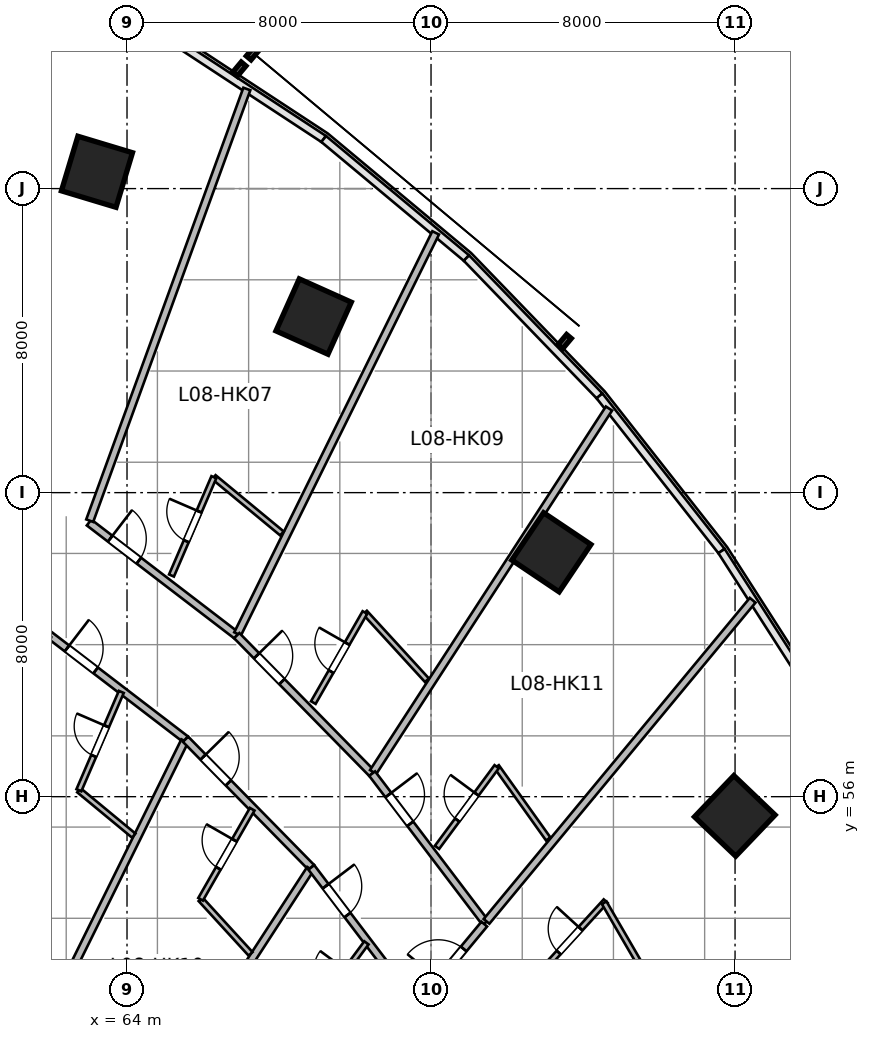
"""IFC4 building model, lengths in metres.
Left out: names, types, materials, properties, quantities, classifications, styles, units other than length and angle.
Written with IfcOpenShell. Run it as: python <this file> out.ifc"""

import sys

from ifc_helpers import new_model, si_unit, direction, frame, frame_2d, origin, origin_2d, place, context, subcontext, project, spatial, rectangle, extrude, source, transform, mapped, element, fill, save


model = new_model("IFC4")
c1 = context("Model", 3, precision=1e-05, world=origin(), true_north=direction((0.0, 1.0)))
c2 = subcontext(c1, "Body", "Model", "MODEL_VIEW")
j1 = project(units=[si_unit("LENGTHUNIT", "METRE"), si_unit("PLANEANGLEUNIT", "RADIAN")], contexts=[c1])
p1 = place(None, origin())
s1 = spatial("IfcSite", under=j1, at=p1, CompositionType="ELEMENT")
p2 = place(p1, origin())
s2 = spatial("IfcBuilding", under=s1, at=p2, CompositionType="ELEMENT")
p3 = place(p2, frame((0.0, 0.0, 42.6)))
s3 = spatial("IfcBuildingStorey", under=s2, at=p3, CompositionType="ELEMENT", Elevation=42.6)
m1 = source(origin(), c2, "Body", "SweptSolid", [
    extrude(rectangle(XDim=1.5, YDim=1.5, at=origin_2d()), origin(), (0.0, 0.0, 1.0), 3.6),
])
for number, where, z_axis, x_axis in (
    (1, (63.209, 72.442, 0.0), (0.0, 0.0, 1.0), (0.289, 0.957, 0.0)),
    (2, (68.91, 68.633, 0.0), (0.0, 0.0, 1.0), (0.409, 0.912, 0.0)),
    (3, (75.167, 62.43, 0.0), (0.0, 0.0, 1.0), (0.558, 0.83, 0.0)),
    (4, (79.993, 55.494, 0.0), (0.0, 0.0, 1.0), (0.691, 0.723, 0.0)),
):
    element("IfcColumn", number, at=place(p3, frame(where, z_axis=z_axis, x_axis=x_axis)), inside=s3, PredefinedType="COLUMN", context=c2, shape_type="MappedRepresentation", body=[
        mapped(m1, transform((0.0, 0.0, 0.0), scale=1.0)),
    ])
m2 = source(origin(), c2, "Body", "SweptSolid", [
    extrude(rectangle(XDim=4.895, YDim=0.195, at=frame_2d((2.447, 0.0))), origin(), (0.0, 0.0, 1.0), 3.36),
])
p4 = place(p3, frame((63.001, 63.214, 0.0), z_axis=(0.0, 0.0, 1.0), x_axis=(0.793896075849, -0.608053468661, 0.0)))
e5 = element("IfcWall", 5, at=p4, inside=s3, PredefinedType="PARTITIONING", context=c2, shape_type="MappedRepresentation", body=[
    mapped(m2, transform((0.0, 0.0, 0.0), scale=1.0)),
])
p5 = place(p4, frame((0.7, 0.0, 0.0)))
e6 = element("IfcOpeningElement", 6, at=p5, cuts=e5, PredefinedType="OPENING", context=c2, shape_type="SweptSolid", body=[
    extrude(rectangle(XDim=0.95, YDim=2.15, at=frame_2d((0.475, 1.075))), frame((0.0, 0.107, 0.0), z_axis=(0.0, -1.0, 0.0), x_axis=(1.0, 0.0, 0.0)), (0.0, 0.0, 1.0), 0.215),
])
m3 = source(origin(), c2, "Body", "SweptSolid", [
    extrude(rectangle(XDim=12.088, YDim=0.195, at=frame_2d((6.044, 0.0))), origin(), (0.0, 0.0, 1.0), 3.36),
])
p6 = place(p3, frame((63.019, 63.262, 0.0), z_axis=(0.0, 0.0, 1.0), x_axis=(0.34203007529, 0.939689005787, 0.0)))
e7 = element("IfcWall", 7, at=p6, inside=s3, PredefinedType="PARTITIONING", context=c2, shape_type="MappedRepresentation", body=[
    mapped(m3, transform((0.0, 0.0, 0.0), scale=1.0)),
])
m4 = source(origin(), c2, "Body", "SweptSolid", [
    extrude(rectangle(XDim=11.77, YDim=0.195, at=frame_2d((5.885, 0.0))), origin(), (0.0, 0.0, 1.0), 3.36),
])
p7 = place(p3, frame((66.909, 60.282, 0.0), z_axis=(0.0, 0.0, 1.0), x_axis=(0.44286060326, 0.896590478468, 0.0)))
e8 = element("IfcWall", 8, at=p7, inside=s3, PredefinedType="PARTITIONING", context=c2, shape_type="MappedRepresentation", body=[
    mapped(m4, transform((0.0, 0.0, 0.0), scale=1.0)),
])
m5 = source(origin(), c2, "Body", "SweptSolid", [
    extrude(rectangle(XDim=2.324, YDim=0.14, at=frame_2d((1.162, 0.0))), origin(), (0.0, 0.0, 1.0), 3.36),
])
p8 = place(p3, frame((66.286, 64.407, 0.0), z_axis=(0.0, 0.0, 1.0), x_axis=(0.770746444956, -0.637141991701, 0.0)))
e9 = element("IfcWall", 9, at=p8, inside=s3, PredefinedType="PARTITIONING", context=c2, shape_type="MappedRepresentation", body=[
    mapped(m5, transform((0.0, 0.0, 0.0), scale=1.0)),
])
m6 = source(origin(), c2, "Body", "SweptSolid", [
    extrude(rectangle(XDim=2.818, YDim=0.14, at=frame_2d((1.409, 0.0))), origin(), (0.0, 0.0, 1.0), 3.36),
])
p9 = place(p3, frame((65.17, 61.819, 0.0), z_axis=(0.0, 0.0, 1.0), x_axis=(0.395894859341, 0.918295845764, 0.0)))
e10 = element("IfcWall", 10, at=p9, inside=s3, PredefinedType="PARTITIONING", context=c2, shape_type="MappedRepresentation", body=[
    mapped(m6, transform((0.0, 0.0, 0.0), scale=1.0)),
])
p10 = place(p9, frame((0.984, 0.0, 0.0)))
e11 = element("IfcOpeningElement", 11, at=p10, cuts=e10, PredefinedType="OPENING", context=c2, shape_type="SweptSolid", body=[
    extrude(rectangle(XDim=0.85, YDim=2.05, at=frame_2d((0.425, 1.025))), frame((0.0, 0.08, 0.0), z_axis=(0.0, -1.0, 0.0), x_axis=(1.0, 0.0, 0.0)), (0.0, 0.0, 1.0), 0.16),
])
m7 = source(origin(), c2, "Body", "SweptSolid", [
    extrude(rectangle(XDim=4.546, YDim=0.195, at=frame_2d((2.273, 0.0))), origin(), (0.0, 0.0, 1.0), 3.36),
])
p11 = place(p3, frame((61.931, 60.275, 0.0), z_axis=(0.0, 0.0, 1.0), x_axis=(0.793907931297, -0.608037989457, 0.0)))
e12 = element("IfcWall", 12, at=p11, inside=s3, PredefinedType="PARTITIONING", context=c2, shape_type="MappedRepresentation", body=[
    mapped(m7, transform((0.0, 0.0, 0.0), scale=1.0)),
])
p12 = place(p11, frame((0.616, 0.0, 0.0)))
e13 = element("IfcOpeningElement", 13, at=p12, cuts=e12, PredefinedType="OPENING", context=c2, shape_type="SweptSolid", body=[
    extrude(rectangle(XDim=0.95, YDim=2.15, at=frame_2d((0.475, 1.075))), frame((0.0, 0.107, 0.0), z_axis=(0.0, -1.0, 0.0), x_axis=(1.0, 0.0, 0.0)), (0.0, 0.0, 1.0), 0.215),
])
m8 = source(origin(), c2, "Body", "SweptSolid", [
    extrude(rectangle(XDim=11.844, YDim=0.195, at=frame_2d((5.922, 0.0))), origin(), (0.0, 0.0, 1.0), 3.36),
])
p13 = place(p3, frame((60.273, 46.848, 0.0), z_axis=(0.0, 0.0, 1.0), x_axis=(0.442871152218, 0.896585267854, 0.0)))
e14 = element("IfcWall", 14, at=p13, inside=s3, PredefinedType="PARTITIONING", context=c2, shape_type="MappedRepresentation", body=[
    mapped(m8, transform((0.0, 0.0, 0.0), scale=1.0)),
])
m9 = source(origin(), c2, "Body", "SweptSolid", [
    extrude(rectangle(XDim=1.873, YDim=0.14, at=frame_2d((0.937, 0.0))), origin(), (0.0, 0.0, 1.0), 3.36),
])
p14 = place(p3, frame((62.734, 56.169, 0.0), z_axis=(0.0, 0.0, 1.0), x_axis=(0.77069451688, -0.637204803537, 0.0)))
e15 = element("IfcWall", 15, at=p14, inside=s3, PredefinedType="PARTITIONING", context=c2, shape_type="MappedRepresentation", body=[
    mapped(m9, transform((0.0, 0.0, 0.0), scale=1.0)),
])
m10 = source(origin(), c2, "Body", "SweptSolid", [
    extrude(rectangle(XDim=2.817, YDim=0.14, at=frame_2d((1.409, 0.0))), origin(), (0.0, 0.0, 1.0), 3.36),
])
p15 = place(p3, frame((62.734, 56.169, 0.0), z_axis=(0.0, 0.0, 1.0), x_axis=(0.395999429727, 0.918250756415, 0.0)))
e16 = element("IfcWall", 16, at=p15, inside=s3, PredefinedType="PARTITIONING", context=c2, shape_type="MappedRepresentation", body=[
    mapped(m10, transform((0.0, 0.0, 0.0), scale=1.0)),
])
p16 = place(p15, frame((0.984, 0.0, 0.0)))
e17 = element("IfcOpeningElement", 17, at=p16, cuts=e16, PredefinedType="OPENING", context=c2, shape_type="SweptSolid", body=[
    extrude(rectangle(XDim=0.85, YDim=2.05, at=frame_2d((0.425, 1.025))), frame((0.0, 0.08, 0.0), z_axis=(0.0, -1.0, 0.0), x_axis=(1.0, 0.0, 0.0)), (0.0, 0.0, 1.0), 0.16),
])
m11 = source(origin(), c2, "Body", "SweptSolid", [
    extrude(rectangle(XDim=5.087, YDim=0.195, at=frame_2d((2.543, 0.0))), origin(), (0.0, 0.0, 1.0), 3.36),
])
p17 = place(p3, frame((66.887, 60.238, 0.0), z_axis=(0.0, 0.0, 1.0), x_axis=(0.700428330775, -0.7137227427, 0.0)))
e18 = element("IfcWall", 18, at=p17, inside=s3, PredefinedType="PARTITIONING", context=c2, shape_type="MappedRepresentation", body=[
    mapped(m11, transform((0.0, 0.0, 0.0), scale=1.0)),
])
p18 = place(p17, frame((0.746, 0.0, 0.0)))
e19 = element("IfcOpeningElement", 19, at=p18, cuts=e18, PredefinedType="OPENING", context=c2, shape_type="SweptSolid", body=[
    extrude(rectangle(XDim=0.95, YDim=2.15, at=frame_2d((0.475, 1.075))), frame((0.0, 0.107, 0.0), z_axis=(0.0, -1.0, 0.0), x_axis=(1.0, 0.0, 0.0)), (0.0, 0.0, 1.0), 0.215),
])
m12 = source(origin(), c2, "Body", "SweptSolid", [
    extrude(rectangle(XDim=11.403, YDim=0.195, at=frame_2d((5.701, 0.0))), origin(), (0.0, 0.0, 1.0), 3.36),
])
p19 = place(p3, frame((70.477, 56.647, 0.0), z_axis=(0.0, 0.0, 1.0), x_axis=(0.544246090008, 0.838925618581, 0.0)))
e20 = element("IfcWall", 20, at=p19, inside=s3, PredefinedType="PARTITIONING", context=c2, shape_type="MappedRepresentation", body=[
    mapped(m12, transform((0.0, 0.0, 0.0), scale=1.0)),
])
m13 = source(origin(), c2, "Body", "SweptSolid", [
    extrude(rectangle(XDim=2.416, YDim=0.14, at=frame_2d((1.208, 0.0))), origin(), (0.0, 0.0, 1.0), 3.36),
])
p20 = place(p3, frame((70.26, 60.846, 0.0), z_axis=(0.0, 0.0, 1.0), x_axis=(0.675399637907, -0.737451916476, 0.0)))
e21 = element("IfcWall", 21, at=p20, inside=s3, PredefinedType="PARTITIONING", context=c2, shape_type="MappedRepresentation", body=[
    mapped(m13, transform((0.0, 0.0, 0.0), scale=1.0)),
])
m14 = source(origin(), c2, "Body", "SweptSolid", [
    extrude(rectangle(XDim=2.732, YDim=0.14, at=frame_2d((1.366, 0.0))), origin(), (0.0, 0.0, 1.0), 3.36),
])
p21 = place(p3, frame((68.902, 58.476, 0.0), z_axis=(0.0, 0.0, 1.0), x_axis=(0.497254966372, 0.867604459658, 0.0)))
e22 = element("IfcWall", 22, at=p21, inside=s3, PredefinedType="PARTITIONING", context=c2, shape_type="MappedRepresentation", body=[
    mapped(m14, transform((0.0, 0.0, 0.0), scale=1.0)),
])
p22 = place(p21, frame((0.941, 0.0, 0.0)))
e23 = element("IfcOpeningElement", 23, at=p22, cuts=e22, PredefinedType="OPENING", context=c2, shape_type="SweptSolid", body=[
    extrude(rectangle(XDim=0.85, YDim=2.05, at=frame_2d((0.425, 1.025))), frame((0.0, 0.08, 0.0), z_axis=(0.0, -1.0, 0.0), x_axis=(1.0, 0.0, 0.0)), (0.0, 0.0, 1.0), 0.16),
])
m15 = source(origin(), c2, "Body", "SweptSolid", [
    extrude(rectangle(XDim=4.724, YDim=0.195, at=frame_2d((2.362, 0.0))), origin(), (0.0, 0.0, 1.0), 3.36),
])
p23 = place(p3, frame((65.541, 57.511, 0.0), z_axis=(0.0, 0.0, 1.0), x_axis=(0.700435057457, -0.713716141253, 0.0)))
e24 = element("IfcWall", 24, at=p23, inside=s3, PredefinedType="PARTITIONING", context=c2, shape_type="MappedRepresentation", body=[
    mapped(m15, transform((0.0, 0.0, 0.0), scale=1.0)),
])
p24 = place(p23, frame((0.659, 0.0, 0.0)))
e25 = element("IfcOpeningElement", 25, at=p24, cuts=e24, PredefinedType="OPENING", context=c2, shape_type="SweptSolid", body=[
    extrude(rectangle(XDim=0.95, YDim=2.15, at=frame_2d((0.475, 1.075))), frame((0.0, 0.107, 0.0), z_axis=(0.0, -1.0, 0.0), x_axis=(1.0, 0.0, 0.0)), (0.0, 0.0, 1.0), 0.215),
])
m16 = source(origin(), c2, "Body", "SweptSolid", [
    extrude(rectangle(XDim=11.429, YDim=0.195, at=frame_2d((5.714, 0.0))), origin(), (0.0, 0.0, 1.0), 3.36),
])
p25 = place(p3, frame((62.604, 44.511, 0.0), z_axis=(0.0, 0.0, 1.0), x_axis=(0.544215487077, 0.838945471187, 0.0)))
e26 = element("IfcWall", 26, at=p25, inside=s3, PredefinedType="PARTITIONING", context=c2, shape_type="MappedRepresentation", body=[
    mapped(m16, transform((0.0, 0.0, 0.0), scale=1.0)),
])
m17 = source(origin(), c2, "Body", "SweptSolid", [
    extrude(rectangle(XDim=1.947, YDim=0.14, at=frame_2d((0.973, 0.0))), origin(), (0.0, 0.0, 1.0), 2.803),
])
p26 = place(p3, frame((65.936, 53.3, 0.0), z_axis=(0.0, 0.0, 1.0), x_axis=(0.675383794012, -0.737466426888, 0.0)))
e27 = element("IfcWall", 27, at=p26, inside=s3, PredefinedType="PARTITIONING", context=c2, shape_type="MappedRepresentation", body=[
    mapped(m17, transform((0.0, 0.0, 0.0), scale=1.0)),
])
m18 = source(origin(), c2, "Body", "SweptSolid", [
    extrude(rectangle(XDim=2.731, YDim=0.14, at=frame_2d((1.366, 0.0))), origin(), (0.0, 0.0, 1.0), 3.36),
])
p27 = place(p3, frame((65.936, 53.3, 0.0), z_axis=(0.0, 0.0, 1.0), x_axis=(0.497120404056, 0.867681568244, 0.0)))
e28 = element("IfcWall", 28, at=p27, inside=s3, PredefinedType="PARTITIONING", context=c2, shape_type="MappedRepresentation", body=[
    mapped(m18, transform((0.0, 0.0, 0.0), scale=1.0)),
])
p28 = place(p27, frame((0.941, 0.0, 0.0)))
e29 = element("IfcOpeningElement", 29, at=p28, cuts=e28, PredefinedType="OPENING", context=c2, shape_type="SweptSolid", body=[
    extrude(rectangle(XDim=0.85, YDim=2.05, at=frame_2d((0.425, 1.025))), frame((0.0, 0.08, 0.0), z_axis=(0.0, -1.0, 0.0), x_axis=(1.0, 0.0, 0.0)), (0.0, 0.0, 1.0), 0.16),
])
m19 = source(origin(), c2, "Body", "SweptSolid", [
    extrude(rectangle(XDim=4.928, YDim=0.195, at=frame_2d((2.464, 0.0))), origin(), (0.0, 0.0, 1.0), 3.36),
])
p29 = place(p3, frame((70.45, 56.607, 0.0), z_axis=(0.0, 0.0, 1.0), x_axis=(0.604793043708, -0.796382680803, 0.0)))
e30 = element("IfcWall", 30, at=p29, inside=s3, PredefinedType="PARTITIONING", context=c2, shape_type="MappedRepresentation", body=[
    mapped(m19, transform((0.0, 0.0, 0.0), scale=1.0)),
])
p30 = place(p29, frame((0.708, 0.0, 0.0)))
e31 = element("IfcOpeningElement", 31, at=p30, cuts=e30, PredefinedType="OPENING", context=c2, shape_type="SweptSolid", body=[
    extrude(rectangle(XDim=0.95, YDim=2.15, at=frame_2d((0.475, 1.075))), frame((0.0, 0.107, 0.0), z_axis=(0.0, -1.0, 0.0), x_axis=(1.0, 0.0, 0.0)), (0.0, 0.0, 1.0), 0.215),
])
m20 = source(origin(), c2, "Body", "SweptSolid", [
    extrude(rectangle(XDim=10.975, YDim=0.195, at=frame_2d((5.487, 0.0))), origin(), (0.0, 0.0, 1.0), 3.36),
])
p31 = place(p3, frame((73.46, 52.719, 0.0), z_axis=(0.0, 0.0, 1.0), x_axis=(0.638125265812, 0.769932558821, 0.0)))
e32 = element("IfcWall", 32, at=p31, inside=s3, PredefinedType="PARTITIONING", context=c2, shape_type="MappedRepresentation", body=[
    mapped(m20, transform((0.0, 0.0, 0.0), scale=1.0)),
])
m21 = source(origin(), c2, "Body", "SweptSolid", [
    extrude(rectangle(XDim=2.337, YDim=0.14, at=frame_2d((1.169, 0.0))), origin(), (0.0, 0.0, 1.0), 3.36),
])
p32 = place(p3, frame((73.727, 56.789, 0.0), z_axis=(0.0, 0.0, 1.0), x_axis=(0.580862665959, -0.814001574504, 0.0)))
e33 = element("IfcWall", 33, at=p32, inside=s3, PredefinedType="PARTITIONING", context=c2, shape_type="MappedRepresentation", body=[
    mapped(m21, transform((0.0, 0.0, 0.0), scale=1.0)),
])
m22 = source(origin(), c2, "Body", "SweptSolid", [
    extrude(rectangle(XDim=2.64, YDim=0.14, at=frame_2d((1.32, 0.0))), origin(), (0.0, 0.0, 1.0), 3.36),
])
p33 = place(p3, frame((72.157, 54.666, 0.0), z_axis=(0.0, 0.0, 1.0), x_axis=(0.594630255283, 0.803999290735, 0.0)))
e34 = element("IfcWall", 34, at=p33, inside=s3, PredefinedType="PARTITIONING", context=c2, shape_type="MappedRepresentation", body=[
    mapped(m22, transform((0.0, 0.0, 0.0), scale=1.0)),
])
p34 = place(p33, frame((0.895, 0.0, 0.0)))
e35 = element("IfcOpeningElement", 35, at=p34, cuts=e34, PredefinedType="OPENING", context=c2, shape_type="SweptSolid", body=[
    extrude(rectangle(XDim=0.85, YDim=2.05, at=frame_2d((0.425, 1.025))), frame((0.0, 0.08, 0.0), z_axis=(0.0, -1.0, 0.0), x_axis=(1.0, 0.0, 0.0)), (0.0, 0.0, 1.0), 0.16),
])
m23 = source(origin(), c2, "Body", "SweptSolid", [
    extrude(rectangle(XDim=4.576, YDim=0.195, at=frame_2d((2.288, 0.0))), origin(), (0.0, 0.0, 1.0), 3.36),
])
p35 = place(p3, frame((68.85, 54.139, 0.0), z_axis=(0.0, 0.0, 1.0), x_axis=(0.604795096156, -0.796381122118, 0.0)))
e36 = element("IfcWall", 36, at=p35, inside=s3, PredefinedType="PARTITIONING", context=c2, shape_type="MappedRepresentation", body=[
    mapped(m23, transform((0.0, 0.0, 0.0), scale=1.0)),
])
p36 = place(p35, frame((0.623, 0.0, 0.0)))
e37 = element("IfcOpeningElement", 37, at=p36, cuts=e36, PredefinedType="OPENING", context=c2, shape_type="SweptSolid", body=[
    extrude(rectangle(XDim=0.95, YDim=2.15, at=frame_2d((0.475, 1.075))), frame((0.0, 0.107, 0.0), z_axis=(0.0, -1.0, 0.0), x_axis=(1.0, 0.0, 0.0)), (0.0, 0.0, 1.0), 0.215),
])
p37 = place(p3, frame((68.729, 50.031, 0.0), z_axis=(0.0, 0.0, 1.0), x_axis=(0.594674469522, 0.803966588422, 0.0)))
e38 = element("IfcWall", 38, at=p37, inside=s3, PredefinedType="PARTITIONING", context=c2, shape_type="MappedRepresentation", body=[
    mapped(m22, transform((0.0, 0.0, 0.0), scale=1.0)),
])
p38 = place(p37, frame((0.895, 0.0, 0.0)))
e39 = element("IfcOpeningElement", 39, at=p38, cuts=e38, PredefinedType="OPENING", context=c2, shape_type="SweptSolid", body=[
    extrude(rectangle(XDim=0.85, YDim=2.05, at=frame_2d((0.425, 1.025))), frame((0.0, 0.08, 0.0), z_axis=(0.0, -1.0, 0.0), x_axis=(1.0, 0.0, 0.0)), (0.0, 0.0, 1.0), 0.16),
])
m24 = source(origin(), c2, "Body", "SweptSolid", [
    extrude(rectangle(XDim=2.748, YDim=0.195, at=frame_2d((1.374, 0.0))), origin(), (0.0, 0.0, 1.0), 3.36),
])
p39 = place(p3, frame((71.647, 50.531, 0.0), z_axis=(0.0, 0.0, 1.0), x_axis=(0.638111168284, 0.769944242729, 0.0)))
e40 = element("IfcWall", 40, at=p39, inside=s3, PredefinedType="PARTITIONING", context=c2, shape_type="MappedRepresentation", body=[
    mapped(m24, transform((0.0, 0.0, 0.0), scale=1.0)),
])
p40 = place(p39, frame((0.849, 0.0, 0.0)))
e41 = element("IfcOpeningElement", 41, at=p40, cuts=e40, PredefinedType="OPENING", context=c2, shape_type="SweptSolid", body=[
    extrude(rectangle(XDim=1.05, YDim=2.15, at=frame_2d((0.525, 1.075))), frame((0.0, 0.107, 0.0), z_axis=(0.0, -1.0, 0.0), x_axis=(1.0, 0.0, 0.0)), (0.0, 0.0, 1.0), 0.215),
])
m25 = source(origin(), c2, "Body", "SweptSolid", [
    extrude(rectangle(XDim=2.812, YDim=0.14, at=frame_2d((1.406, 0.0))), origin(), (0.0, 0.0, 1.0), 3.36),
])
p41 = place(p3, frame((74.697, 51.177, 0.0), z_axis=(0.0, 0.0, 1.0), x_axis=(0.675119025852, 0.737708818527, 0.0)))
e42 = element("IfcWall", 42, at=p41, inside=s3, PredefinedType="PARTITIONING", context=c2, shape_type="MappedRepresentation", body=[
    mapped(m25, transform((0.0, 0.0, 0.0), scale=1.0)),
])
p42 = place(p41, frame((0.981, 0.0, 0.0)))
e43 = element("IfcOpeningElement", 43, at=p42, cuts=e42, PredefinedType="OPENING", context=c2, shape_type="SweptSolid", body=[
    extrude(rectangle(XDim=0.85, YDim=2.05, at=frame_2d((0.425, 1.025))), frame((0.0, 0.08, 0.0), z_axis=(0.0, -1.0, 0.0), x_axis=(1.0, 0.0, 0.0)), (0.0, 0.0, 1.0), 0.16),
])
m26 = source(origin(), c2, "Body", "SweptSolid", [
    extrude(rectangle(XDim=2.045, YDim=0.14, at=frame_2d((1.022, 0.0))), origin(), (0.0, 0.0, 1.0), 3.36),
])
p43 = place(p3, frame((76.557, 53.209, 0.0), z_axis=(0.0, 0.0, 1.0), x_axis=(0.5023112139, -0.864686905411, 0.0)))
e44 = element("IfcWall", 44, at=p43, inside=s3, PredefinedType="PARTITIONING", context=c2, shape_type="MappedRepresentation", body=[
    mapped(m26, transform((0.0, 0.0, 0.0), scale=1.0)),
])
m27 = source(origin(), c2, "Body", "SweptSolid", [
    extrude(rectangle(XDim=0.95, YDim=2.15, at=frame_2d((0.475, 1.075))), frame((0.0, 0.025, 0.0), z_axis=(0.0, -1.0, 0.0), x_axis=(1.0, 0.0, 0.0)), (0.0, 0.0, 1.0), 0.05),
])
p44 = place(p5, origin())
e45 = element("IfcDoor", 45, at=p44, inside=s3, OperationType="SINGLE_SWING_LEFT", PredefinedType="DOOR", context=c2, shape_type="MappedRepresentation", body=[
    mapped(m27, transform((0.0, 0.0, 0.0), scale=1.0)),
])
fill(e6, e45)
m28 = source(origin(), c2, "Body", "SweptSolid", [
    extrude(rectangle(XDim=0.85, YDim=2.05, at=frame_2d((0.425, 1.025))), frame((0.0, 0.025, 0.0), z_axis=(0.0, -1.0, 0.0), x_axis=(1.0, 0.0, 0.0)), (0.0, 0.0, 1.0), 0.05),
])
p45 = place(p10, origin())
e46 = element("IfcDoor", 46, at=p45, inside=s3, OperationType="SINGLE_SWING_RIGHT", PredefinedType="DOOR", context=c2, shape_type="MappedRepresentation", body=[
    mapped(m28, transform((0.0, 0.0, 0.0), scale=1.0)),
])
fill(e11, e46)
p46 = place(p12, origin())
e47 = element("IfcDoor", 47, at=p46, inside=s3, OperationType="SINGLE_SWING_LEFT", PredefinedType="DOOR", context=c2, shape_type="MappedRepresentation", body=[
    mapped(m27, transform((0.0, 0.0, 0.0), scale=1.0)),
])
fill(e13, e47)
p47 = place(p16, origin())
e48 = element("IfcDoor", 48, at=p47, inside=s3, OperationType="SINGLE_SWING_RIGHT", PredefinedType="DOOR", context=c2, shape_type="MappedRepresentation", body=[
    mapped(m28, transform((0.0, 0.0, 0.0), scale=1.0)),
])
fill(e17, e48)
p48 = place(p18, origin())
e49 = element("IfcDoor", 49, at=p48, inside=s3, OperationType="SINGLE_SWING_LEFT", PredefinedType="DOOR", context=c2, shape_type="MappedRepresentation", body=[
    mapped(m27, transform((0.0, 0.0, 0.0), scale=1.0)),
])
fill(e19, e49)
p49 = place(p22, origin())
e50 = element("IfcDoor", 50, at=p49, inside=s3, OperationType="SINGLE_SWING_RIGHT", PredefinedType="DOOR", context=c2, shape_type="MappedRepresentation", body=[
    mapped(m28, transform((0.0, 0.0, 0.0), scale=1.0)),
])
fill(e23, e50)
p50 = place(p24, origin())
e51 = element("IfcDoor", 51, at=p50, inside=s3, OperationType="SINGLE_SWING_LEFT", PredefinedType="DOOR", context=c2, shape_type="MappedRepresentation", body=[
    mapped(m27, transform((0.0, 0.0, 0.0), scale=1.0)),
])
fill(e25, e51)
p51 = place(p28, origin())
e52 = element("IfcDoor", 52, at=p51, inside=s3, OperationType="SINGLE_SWING_RIGHT", PredefinedType="DOOR", context=c2, shape_type="MappedRepresentation", body=[
    mapped(m28, transform((0.0, 0.0, 0.0), scale=1.0)),
])
fill(e29, e52)
p52 = place(p30, origin())
e53 = element("IfcDoor", 53, at=p52, inside=s3, OperationType="SINGLE_SWING_LEFT", PredefinedType="DOOR", context=c2, shape_type="MappedRepresentation", body=[
    mapped(m27, transform((0.0, 0.0, 0.0), scale=1.0)),
])
fill(e31, e53)
p53 = place(p34, origin())
e54 = element("IfcDoor", 54, at=p53, inside=s3, OperationType="SINGLE_SWING_RIGHT", PredefinedType="DOOR", context=c2, shape_type="MappedRepresentation", body=[
    mapped(m28, transform((0.0, 0.0, 0.0), scale=1.0)),
])
fill(e35, e54)
p54 = place(p36, origin())
e55 = element("IfcDoor", 55, at=p54, inside=s3, OperationType="SINGLE_SWING_LEFT", PredefinedType="DOOR", context=c2, shape_type="MappedRepresentation", body=[
    mapped(m27, transform((0.0, 0.0, 0.0), scale=1.0)),
])
fill(e37, e55)
m29 = source(origin(), c2, "Body", "SweptSolid", [
    extrude(rectangle(XDim=1.05, YDim=2.15, at=frame_2d((0.525, 1.075))), frame((0.0, 0.025, 0.0), z_axis=(0.0, -1.0, 0.0), x_axis=(1.0, 0.0, 0.0)), (0.0, 0.0, 1.0), 0.05),
])
p55 = place(p40, origin())
e56 = element("IfcDoor", 56, at=p55, inside=s3, OperationType="SINGLE_SWING_LEFT", PredefinedType="DOOR", context=c2, shape_type="MappedRepresentation", body=[
    mapped(m29, transform((0.0, 0.0, 0.0), scale=1.0)),
])
fill(e41, e56)
p56 = place(p42, origin())
e57 = element("IfcDoor", 57, at=p56, inside=s3, OperationType="SINGLE_SWING_RIGHT", PredefinedType="DOOR", context=c2, shape_type="MappedRepresentation", body=[
    mapped(m28, transform((0.0, 0.0, 0.0), scale=1.0)),
])
fill(e43, e57)
save(model, sys.argv[1])
